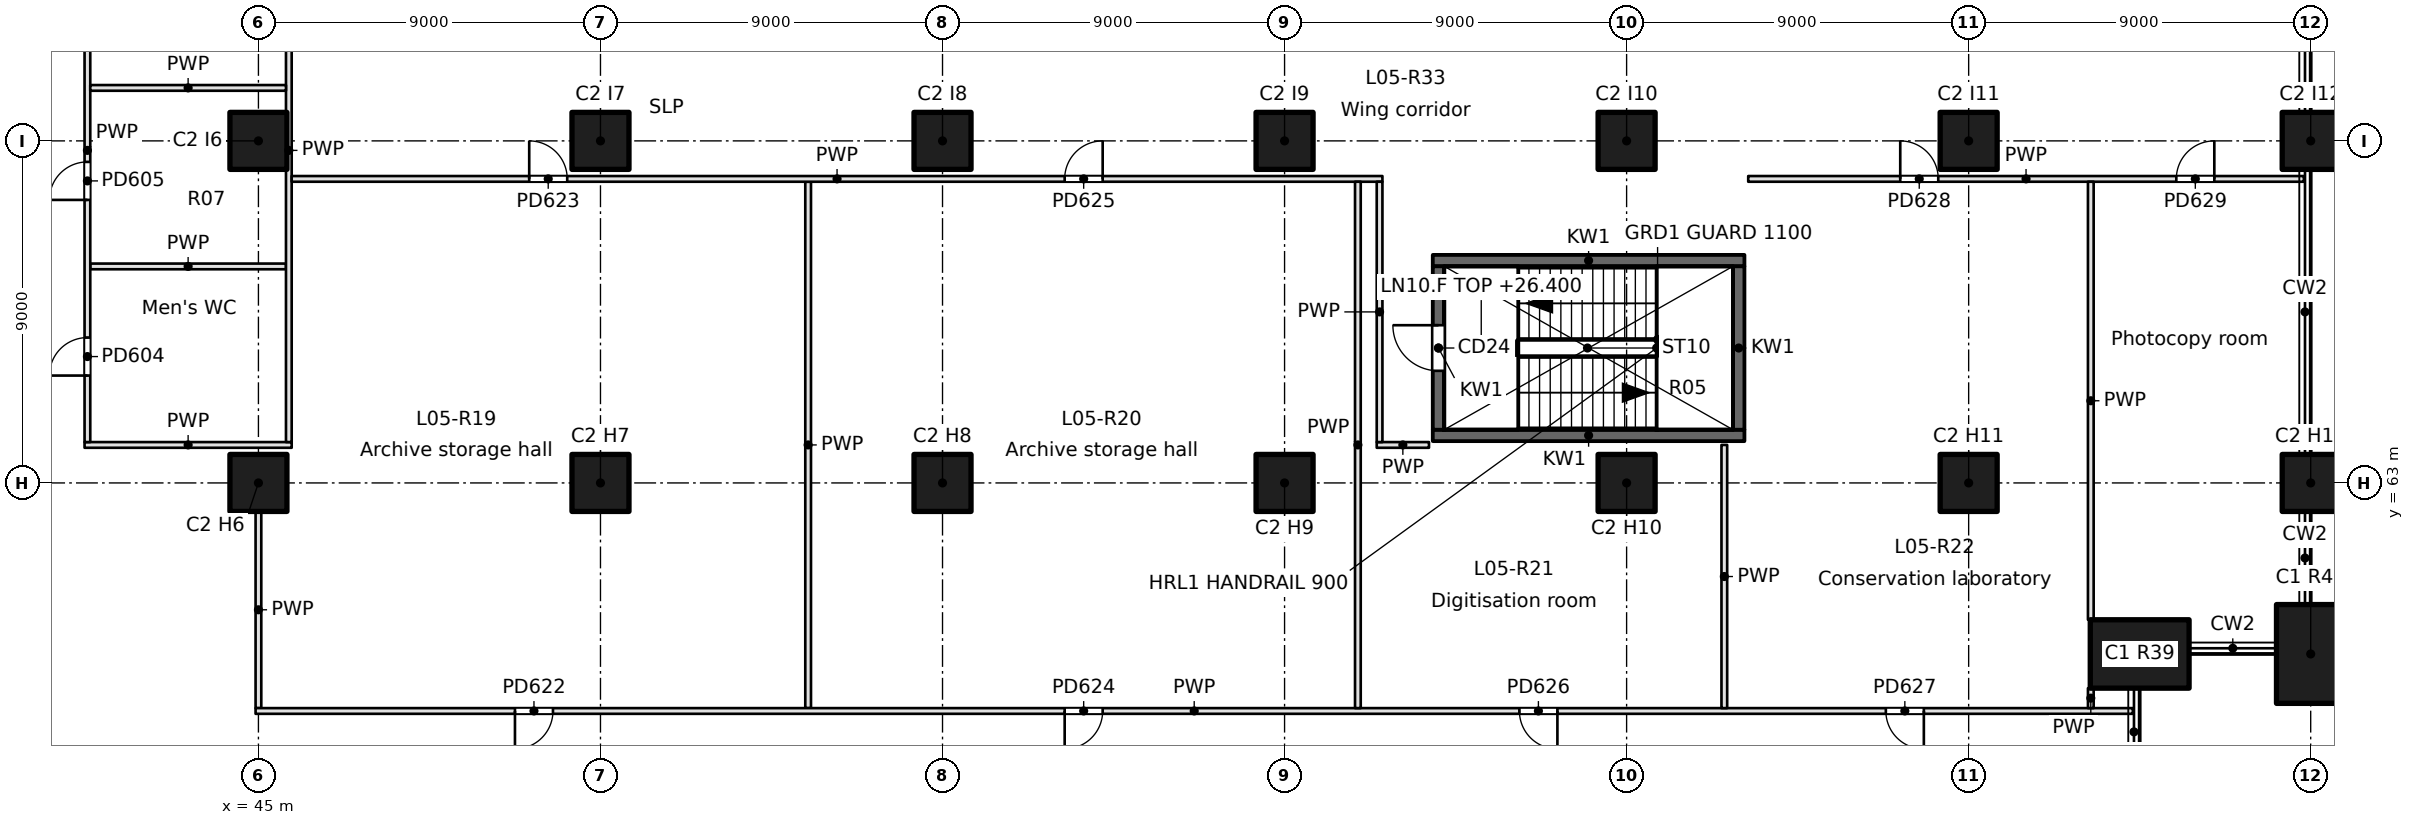
"""IFC4 building model, lengths in metres.
Left out: names, types, materials, properties, quantities, classifications, styles, units other than length and angle.
Written with IfcOpenShell. Run it as: python <this file> out.ifc"""

import sys

from ifc_helpers import new_model, si_unit, direction, frame, frame_2d, origin, origin_2d, place, context, subcontext, project, spatial, rectangle, extrude, element, fill, save


model = new_model("IFC4")
c1 = context("Model", 3, precision=1e-05, world=origin(), true_north=direction((0.0, 1.0)))
c2 = subcontext(c1, "Body", "Model", "MODEL_VIEW")
j1 = project(units=[si_unit("LENGTHUNIT", "METRE"), si_unit("PLANEANGLEUNIT", "RADIAN")], contexts=[c1])
p1 = place(None, origin())
s1 = spatial("IfcSite", under=j1, at=p1, CompositionType="ELEMENT")
p2 = place(p1, origin())
s2 = spatial("IfcBuilding", under=s1, at=p2, CompositionType="ELEMENT")
p3 = place(p2, frame((0.0, 0.0, 26.4)))
s3 = spatial("IfcBuildingStorey", under=s2, at=p3, CompositionType="ELEMENT", Elevation=26.4)
for number, where, z_axis, x_axis in (
    (1, (94.5, 58.5, 0.0), (0.0, 0.0, 1.0), (1.0, 0.0, 0.0)),
    (2, (99.0, 58.5, 0.0), (0.0, 0.0, 1.0), (0.0, 1.0, 0.0)),
):
    element("IfcColumn", number, at=place(p3, frame(where, z_axis=z_axis, x_axis=x_axis)), inside=s3, PredefinedType="COLUMN", context=c2, shape_type="SweptSolid", body=[
        extrude(rectangle(XDim=2.6, YDim=1.8, at=origin_2d()), origin(), (0.0, 0.0, 1.0), 4.8),
    ])
for number, where, z_axis, x_axis in (
    (3, (99.0, 63.0, 0.0), (0.0, 0.0, 1.0), (1.0, 0.0, 0.0)),
    (4, (99.0, 72.0, 0.0), (0.0, 0.0, 1.0), (1.0, 0.0, 0.0)),
    (5, (45.0, 63.0, 0.0), (0.0, 0.0, 1.0), (1.0, 0.0, 0.0)),
    (6, (45.0, 72.0, 0.0), (0.0, 0.0, 1.0), (1.0, 0.0, 0.0)),
    (7, (54.0, 63.0, 0.0), (0.0, 0.0, 1.0), (1.0, 0.0, 0.0)),
    (8, (54.0, 72.0, 0.0), (0.0, 0.0, 1.0), (1.0, 0.0, 0.0)),
    (9, (63.0, 63.0, 0.0), (0.0, 0.0, 1.0), (1.0, 0.0, 0.0)),
    (10, (63.0, 72.0, 0.0), (0.0, 0.0, 1.0), (1.0, 0.0, 0.0)),
    (11, (72.0, 63.0, 0.0), (0.0, 0.0, 1.0), (1.0, 0.0, 0.0)),
    (12, (72.0, 72.0, 0.0), (0.0, 0.0, 1.0), (1.0, 0.0, 0.0)),
    (13, (81.0, 63.0, 0.0), (0.0, 0.0, 1.0), (1.0, 0.0, 0.0)),
    (14, (81.0, 72.0, 0.0), (0.0, 0.0, 1.0), (1.0, 0.0, 0.0)),
    (15, (90.0, 63.0, 0.0), (0.0, 0.0, 1.0), (1.0, 0.0, 0.0)),
    (16, (90.0, 72.0, 0.0), (0.0, 0.0, 1.0), (1.0, 0.0, 0.0)),
):
    element("IfcColumn", number, at=place(p3, frame(where, z_axis=z_axis, x_axis=x_axis)), inside=s3, PredefinedType="COLUMN", context=c2, shape_type="SweptSolid", body=[
        extrude(rectangle(XDim=1.5, YDim=1.5, at=origin_2d()), origin(), (0.0, 0.0, 1.0), 4.8),
    ])
for number, where, z_axis, x_axis in (
    (17, (75.9, 64.25, -0.35), (0.0, 0.0, 1.0), (1.0, 0.0, 0.0)),
    (18, (75.9, 68.85, -0.35), (0.0, 0.0, 1.0), (1.0, 0.0, 0.0)),
):
    element("IfcWall", number, at=place(p3, frame(where, z_axis=z_axis, x_axis=x_axis)), inside=s3, PredefinedType="SOLIDWALL", context=c2, shape_type="SweptSolid", body=[
        extrude(rectangle(XDim=8.2, YDim=0.3, at=frame_2d((4.1, 0.0))), origin(), (0.0, 0.0, 1.0), 4.7),
    ])
p4 = place(p3, frame((76.05, 64.4, -0.35), z_axis=(0.0, 0.0, 1.0), x_axis=(0.0, 1.0, 0.0)))
e19 = element("IfcWall", 19, at=p4, inside=s3, PredefinedType="SOLIDWALL", context=c2, shape_type="SweptSolid", body=[
    extrude(rectangle(XDim=4.3, YDim=0.3, at=frame_2d((2.15, 0.0))), origin(), (0.0, 0.0, 1.0), 4.7),
])
p5 = place(p4, frame((1.55, 0.0, 0.35)))
e20 = element("IfcOpeningElement", 20, at=p5, cuts=e19, PredefinedType="OPENING", context=c2, shape_type="SweptSolid", body=[
    extrude(rectangle(XDim=1.2, YDim=2.1, at=frame_2d((0.6, 1.05))), frame((0.0, 0.15, 0.0), z_axis=(0.0, -1.0, 0.0), x_axis=(1.0, 0.0, 0.0)), (0.0, 0.0, 1.0), 0.3),
])
p6 = place(p3, frame((83.95, 64.4, -0.35), z_axis=(0.0, 0.0, 1.0), x_axis=(0.0, 1.0, 0.0)))
e21 = element("IfcWall", 21, at=p6, inside=s3, PredefinedType="SOLIDWALL", context=c2, shape_type="SweptSolid", body=[
    extrude(rectangle(XDim=4.3, YDim=0.3, at=frame_2d((2.15, 0.0))), origin(), (0.0, 0.0, 1.0), 4.7),
])
p7 = place(p3, frame((40.575, 68.697, 0.0), z_axis=(0.0, 0.0, 1.0), x_axis=(1.0, 0.0, 0.0)))
e22 = element("IfcWall", 22, at=p7, inside=s3, PredefinedType="PARTITIONING", context=c2, shape_type="SweptSolid", body=[
    extrude(rectangle(XDim=5.15, YDim=0.15, at=frame_2d((2.575, 0.0))), origin(), (0.0, 0.0, 1.0), 4.35),
])
p8 = place(p3, frame((45.875, 64.0, 0.0), z_axis=(0.0, 0.0, 1.0), x_axis=(-1.0, 0.0, 0.0)))
e23 = element("IfcWall", 23, at=p8, inside=s3, PredefinedType="PARTITIONING", context=c2, shape_type="SweptSolid", body=[
    extrude(rectangle(XDim=5.45, YDim=0.15, at=frame_2d((2.725, 0.0))), origin(), (0.0, 0.0, 1.0), 4.35),
])
p9 = place(p3, frame((74.425, 64.0, 0.0), z_axis=(0.0, 0.0, 1.0), x_axis=(1.0, 0.0, 0.0)))
e24 = element("IfcWall", 24, at=p9, inside=s3, PredefinedType="PARTITIONING", context=c2, shape_type="SweptSolid", body=[
    extrude(rectangle(XDim=1.375, YDim=0.15, at=frame_2d((0.688, 0.0))), origin(), (0.0, 0.0, 1.0), 4.35),
])
p10 = place(p3, frame((45.8, 79.425, 0.0), z_axis=(0.0, 0.0, 1.0), x_axis=(0.0, -1.0, 0.0)))
e25 = element("IfcWall", 25, at=p10, inside=s3, PredefinedType="PARTITIONING", context=c2, shape_type="SweptSolid", body=[
    extrude(rectangle(XDim=15.35, YDim=0.15, at=frame_2d((7.675, 0.0))), origin(), (0.0, 0.0, 1.0), 4.35),
])
p11 = place(p3, frame((40.5, 64.075, 0.0), z_axis=(0.0, 0.0, 1.0), x_axis=(0.0, 1.0, 0.0)))
e26 = element("IfcWall", 26, at=p11, inside=s3, PredefinedType="PARTITIONING", context=c2, shape_type="SweptSolid", body=[
    extrude(rectangle(XDim=15.35, YDim=0.15, at=frame_2d((7.675, 0.0))), origin(), (0.0, 0.0, 1.0), 4.35),
])
p12 = place(p11, frame((1.75, 0.0, 0.0)))
e27 = element("IfcOpeningElement", 27, at=p12, cuts=e26, PredefinedType="OPENING", context=c2, shape_type="SweptSolid", body=[
    extrude(rectangle(XDim=1.0, YDim=2.1, at=frame_2d((0.5, 1.05))), frame((0.0, 0.075, 0.0), z_axis=(0.0, -1.0, 0.0), x_axis=(1.0, 0.0, 0.0)), (0.0, 0.0, 1.0), 0.15),
])
p13 = place(p11, frame((6.372, 0.0, 0.0)))
e28 = element("IfcOpeningElement", 28, at=p13, cuts=e26, PredefinedType="OPENING", context=c2, shape_type="SweptSolid", body=[
    extrude(rectangle(XDim=1.0, YDim=2.1, at=frame_2d((0.5, 1.05))), frame((0.0, 0.075, 0.0), z_axis=(0.0, -1.0, 0.0), x_axis=(1.0, 0.0, 0.0)), (0.0, 0.0, 1.0), 0.15),
])
p14 = place(p11, frame((10.569, 0.0, 0.0)))
e29 = element("IfcOpeningElement", 29, at=p14, cuts=e26, PredefinedType="OPENING", context=c2, shape_type="SweptSolid", body=[
    extrude(rectangle(XDim=1.0, YDim=2.1, at=frame_2d((0.5, 1.05))), frame((0.0, 0.075, 0.0), z_axis=(0.0, -1.0, 0.0), x_axis=(1.0, 0.0, 0.0)), (0.0, 0.0, 1.0), 0.15),
])
p15 = place(p3, frame((40.575, 73.394, 0.0), z_axis=(0.0, 0.0, 1.0), x_axis=(1.0, 0.0, 0.0)))
e30 = element("IfcWall", 30, at=p15, inside=s3, PredefinedType="PARTITIONING", context=c2, shape_type="SweptSolid", body=[
    extrude(rectangle(XDim=5.15, YDim=0.15, at=frame_2d((2.575, 0.0))), origin(), (0.0, 0.0, 1.0), 4.35),
])
p16 = place(p3, frame((45.0, 57.075, 0.0), z_axis=(0.0, 0.0, 1.0), x_axis=(0.0, 1.0, 0.0)))
e31 = element("IfcWall", 31, at=p16, inside=s3, PredefinedType="PARTITIONING", context=c2, shape_type="SweptSolid", body=[
    extrude(rectangle(XDim=5.175, YDim=0.15, at=frame_2d((2.587, 0.0))), origin(), (0.0, 0.0, 1.0), 4.35),
])
p17 = place(p3, frame((59.464, 57.075, 0.0), z_axis=(0.0, 0.0, 1.0), x_axis=(0.0, 1.0, 0.0)))
e32 = element("IfcWall", 32, at=p17, inside=s3, PredefinedType="PARTITIONING", context=c2, shape_type="SweptSolid", body=[
    extrude(rectangle(XDim=13.85, YDim=0.15, at=frame_2d((6.925, 0.0))), origin(), (0.0, 0.0, 1.0), 4.35),
])
p18 = place(p3, frame((94.32, 57.0, 0.0), z_axis=(0.0, 0.0, 1.0), x_axis=(-1.0, 0.0, 0.0)))
e33 = element("IfcWall", 33, at=p18, inside=s3, PredefinedType="PARTITIONING", context=c2, shape_type="SweptSolid", body=[
    extrude(rectangle(XDim=49.395, YDim=0.15, at=frame_2d((24.698, 0.0))), origin(), (0.0, 0.0, 1.0), 4.35),
])
p19 = place(p18, frame((41.57, 0.0, 0.0)))
e34 = element("IfcOpeningElement", 34, at=p19, cuts=e33, PredefinedType="OPENING", context=c2, shape_type="SweptSolid", body=[
    extrude(rectangle(XDim=1.0, YDim=2.1, at=frame_2d((0.5, 1.05))), frame((0.0, 0.075, 0.0), z_axis=(0.0, -1.0, 0.0), x_axis=(1.0, 0.0, 0.0)), (0.0, 0.0, 1.0), 0.15),
])
p20 = place(p18, frame((27.106, 0.0, 0.0)))
e35 = element("IfcOpeningElement", 35, at=p20, cuts=e33, PredefinedType="OPENING", context=c2, shape_type="SweptSolid", body=[
    extrude(rectangle(XDim=1.0, YDim=2.1, at=frame_2d((0.5, 1.05))), frame((0.0, 0.075, 0.0), z_axis=(0.0, -1.0, 0.0), x_axis=(1.0, 0.0, 0.0)), (0.0, 0.0, 1.0), 0.15),
])
p21 = place(p18, frame((15.141, 0.0, 0.0)))
e36 = element("IfcOpeningElement", 36, at=p21, cuts=e33, PredefinedType="OPENING", context=c2, shape_type="SweptSolid", body=[
    extrude(rectangle(XDim=1.0, YDim=2.1, at=frame_2d((0.5, 1.05))), frame((0.0, 0.075, 0.0), z_axis=(0.0, -1.0, 0.0), x_axis=(1.0, 0.0, 0.0)), (0.0, 0.0, 1.0), 0.15),
])
p22 = place(p18, frame((5.499, 0.0, 0.0)))
e37 = element("IfcOpeningElement", 37, at=p22, cuts=e33, PredefinedType="OPENING", context=c2, shape_type="SweptSolid", body=[
    extrude(rectangle(XDim=1.0, YDim=2.1, at=frame_2d((0.5, 1.05))), frame((0.0, 0.075, 0.0), z_axis=(0.0, -1.0, 0.0), x_axis=(1.0, 0.0, 0.0)), (0.0, 0.0, 1.0), 0.15),
])
p23 = place(p3, frame((45.875, 71.0, 0.0), z_axis=(0.0, 0.0, 1.0), x_axis=(1.0, 0.0, 0.0)))
e38 = element("IfcWall", 38, at=p23, inside=s3, PredefinedType="PARTITIONING", context=c2, shape_type="SweptSolid", body=[
    extrude(rectangle(XDim=28.7, YDim=0.15, at=frame_2d((14.35, 0.0))), origin(), (0.0, 0.0, 1.0), 4.35),
])
p24 = place(p23, frame((6.25, 0.0, 0.0)))
e39 = element("IfcOpeningElement", 39, at=p24, cuts=e38, PredefinedType="OPENING", context=c2, shape_type="SweptSolid", body=[
    extrude(rectangle(XDim=1.0, YDim=2.1, at=frame_2d((0.5, 1.05))), frame((0.0, 0.075, 0.0), z_axis=(0.0, -1.0, 0.0), x_axis=(1.0, 0.0, 0.0)), (0.0, 0.0, 1.0), 0.15),
])
p25 = place(p23, frame((20.339, 0.0, 0.0)))
e40 = element("IfcOpeningElement", 40, at=p25, cuts=e38, PredefinedType="OPENING", context=c2, shape_type="SweptSolid", body=[
    extrude(rectangle(XDim=1.0, YDim=2.1, at=frame_2d((0.5, 1.05))), frame((0.0, 0.075, 0.0), z_axis=(0.0, -1.0, 0.0), x_axis=(1.0, 0.0, 0.0)), (0.0, 0.0, 1.0), 0.15),
])
p26 = place(p3, frame((84.2, 71.0, 0.0), z_axis=(0.0, 0.0, 1.0), x_axis=(1.0, 0.0, 0.0)))
e41 = element("IfcWall", 41, at=p26, inside=s3, PredefinedType="PARTITIONING", context=c2, shape_type="SweptSolid", body=[
    extrude(rectangle(XDim=14.62, YDim=0.15, at=frame_2d((7.31, 0.0))), origin(), (0.0, 0.0, 1.0), 4.35),
])
p27 = place(p26, frame((4.0, 0.0, 0.0)))
e42 = element("IfcOpeningElement", 42, at=p27, cuts=e41, PredefinedType="OPENING", context=c2, shape_type="SweptSolid", body=[
    extrude(rectangle(XDim=1.0, YDim=2.1, at=frame_2d((0.5, 1.05))), frame((0.0, 0.075, 0.0), z_axis=(0.0, -1.0, 0.0), x_axis=(1.0, 0.0, 0.0)), (0.0, 0.0, 1.0), 0.15),
])
p28 = place(p26, frame((11.264, 0.0, 0.0)))
e43 = element("IfcOpeningElement", 43, at=p28, cuts=e41, PredefinedType="OPENING", context=c2, shape_type="SweptSolid", body=[
    extrude(rectangle(XDim=1.0, YDim=2.1, at=frame_2d((0.5, 1.05))), frame((0.0, 0.075, 0.0), z_axis=(0.0, -1.0, 0.0), x_axis=(1.0, 0.0, 0.0)), (0.0, 0.0, 1.0), 0.15),
])
p29 = place(p3, frame((73.929, 57.075, 0.0), z_axis=(0.0, 0.0, 1.0), x_axis=(0.0, 1.0, 0.0)))
e44 = element("IfcWall", 44, at=p29, inside=s3, PredefinedType="PARTITIONING", context=c2, shape_type="SweptSolid", body=[
    extrude(rectangle(XDim=13.85, YDim=0.15, at=frame_2d((6.925, 0.0))), origin(), (0.0, 0.0, 1.0), 4.35),
])
p30 = place(p3, frame((83.571, 57.075, 0.0), z_axis=(0.0, 0.0, 1.0), x_axis=(0.0, 1.0, 0.0)))
e45 = element("IfcWall", 45, at=p30, inside=s3, PredefinedType="PARTITIONING", context=c2, shape_type="SweptSolid", body=[
    extrude(rectangle(XDim=6.925, YDim=0.15, at=frame_2d((3.462, 0.0))), origin(), (0.0, 0.0, 1.0), 4.35),
])
p31 = place(p3, frame((74.5, 70.925, 0.0), z_axis=(0.0, 0.0, 1.0), x_axis=(0.0, -1.0, 0.0)))
e46 = element("IfcWall", 46, at=p31, inside=s3, PredefinedType="PARTITIONING", context=c2, shape_type="SweptSolid", body=[
    extrude(rectangle(XDim=6.85, YDim=0.15, at=frame_2d((3.425, 0.0))), origin(), (0.0, 0.0, 1.0), 4.35),
])
p32 = place(p3, frame((93.214, 57.075, 0.0), z_axis=(0.0, 0.0, 1.0), x_axis=(0.0, 1.0, 0.0)))
e47 = element("IfcWall", 47, at=p32, inside=s3, PredefinedType="PARTITIONING", context=c2, shape_type="SweptSolid", body=[
    extrude(rectangle(XDim=0.525, YDim=0.15, at=frame_2d((0.263, 0.0))), origin(), (0.0, 0.0, 1.0), 4.35),
])
p33 = place(p3, frame((93.214, 59.4, 0.0), z_axis=(0.0, 0.0, 1.0), x_axis=(0.0, 1.0, 0.0)))
e48 = element("IfcWall", 48, at=p33, inside=s3, PredefinedType="PARTITIONING", context=c2, shape_type="SweptSolid", body=[
    extrude(rectangle(XDim=11.525, YDim=0.15, at=frame_2d((5.763, 0.0))), origin(), (0.0, 0.0, 1.0), 4.35),
])
p34 = place(p5, origin())
e49 = element("IfcDoor", 49, at=p34, inside=s3, OperationType="SINGLE_SWING_RIGHT", PredefinedType="DOOR", context=c2, shape_type="SweptSolid", body=[
    extrude(rectangle(XDim=1.2, YDim=2.1, at=frame_2d((0.6, 1.05))), frame((0.0, 0.025, 0.0), z_axis=(0.0, -1.0, 0.0), x_axis=(1.0, 0.0, 0.0)), (0.0, 0.0, 1.0), 0.05),
])
fill(e20, e49)
p35 = place(p12, origin())
e50 = element("IfcDoor", 50, at=p35, inside=s3, OperationType="SINGLE_SWING_LEFT", PredefinedType="DOOR", context=c2, shape_type="SweptSolid", body=[
    extrude(rectangle(XDim=1.0, YDim=2.1, at=frame_2d((0.5, 1.05))), frame((0.0, 0.025, 0.0), z_axis=(0.0, -1.0, 0.0), x_axis=(1.0, 0.0, 0.0)), (0.0, 0.0, 1.0), 0.05),
])
fill(e27, e50)
p36 = place(p13, origin())
e51 = element("IfcDoor", 51, at=p36, inside=s3, OperationType="SINGLE_SWING_LEFT", PredefinedType="DOOR", context=c2, shape_type="SweptSolid", body=[
    extrude(rectangle(XDim=1.0, YDim=2.1, at=frame_2d((0.5, 1.05))), frame((0.0, 0.025, 0.0), z_axis=(0.0, -1.0, 0.0), x_axis=(1.0, 0.0, 0.0)), (0.0, 0.0, 1.0), 0.05),
])
fill(e28, e51)
p37 = place(p19, origin())
e52 = element("IfcDoor", 52, at=p37, inside=s3, OperationType="SINGLE_SWING_RIGHT", PredefinedType="DOOR", context=c2, shape_type="SweptSolid", body=[
    extrude(rectangle(XDim=1.0, YDim=2.1, at=frame_2d((0.5, 1.05))), frame((0.0, 0.025, 0.0), z_axis=(0.0, -1.0, 0.0), x_axis=(1.0, 0.0, 0.0)), (0.0, 0.0, 1.0), 0.05),
])
fill(e34, e52)
p38 = place(p24, origin())
e53 = element("IfcDoor", 53, at=p38, inside=s3, OperationType="SINGLE_SWING_LEFT", PredefinedType="DOOR", context=c2, shape_type="SweptSolid", body=[
    extrude(rectangle(XDim=1.0, YDim=2.1, at=frame_2d((0.5, 1.05))), frame((0.0, 0.025, 0.0), z_axis=(0.0, -1.0, 0.0), x_axis=(1.0, 0.0, 0.0)), (0.0, 0.0, 1.0), 0.05),
])
fill(e39, e53)
p39 = place(p20, origin())
e54 = element("IfcDoor", 54, at=p39, inside=s3, OperationType="SINGLE_SWING_RIGHT", PredefinedType="DOOR", context=c2, shape_type="SweptSolid", body=[
    extrude(rectangle(XDim=1.0, YDim=2.1, at=frame_2d((0.5, 1.05))), frame((0.0, 0.025, 0.0), z_axis=(0.0, -1.0, 0.0), x_axis=(1.0, 0.0, 0.0)), (0.0, 0.0, 1.0), 0.05),
])
fill(e35, e54)
p40 = place(p25, origin())
e55 = element("IfcDoor", 55, at=p40, inside=s3, OperationType="SINGLE_SWING_RIGHT", PredefinedType="DOOR", context=c2, shape_type="SweptSolid", body=[
    extrude(rectangle(XDim=1.0, YDim=2.1, at=frame_2d((0.5, 1.05))), frame((0.0, 0.025, 0.0), z_axis=(0.0, -1.0, 0.0), x_axis=(1.0, 0.0, 0.0)), (0.0, 0.0, 1.0), 0.05),
])
fill(e40, e55)
p41 = place(p21, origin())
e56 = element("IfcDoor", 56, at=p41, inside=s3, OperationType="SINGLE_SWING_LEFT", PredefinedType="DOOR", context=c2, shape_type="SweptSolid", body=[
    extrude(rectangle(XDim=1.0, YDim=2.1, at=frame_2d((0.5, 1.05))), frame((0.0, 0.025, 0.0), z_axis=(0.0, -1.0, 0.0), x_axis=(1.0, 0.0, 0.0)), (0.0, 0.0, 1.0), 0.05),
])
fill(e36, e56)
p42 = place(p22, origin())
e57 = element("IfcDoor", 57, at=p42, inside=s3, OperationType="SINGLE_SWING_LEFT", PredefinedType="DOOR", context=c2, shape_type="SweptSolid", body=[
    extrude(rectangle(XDim=1.0, YDim=2.1, at=frame_2d((0.5, 1.05))), frame((0.0, 0.025, 0.0), z_axis=(0.0, -1.0, 0.0), x_axis=(1.0, 0.0, 0.0)), (0.0, 0.0, 1.0), 0.05),
])
fill(e37, e57)
p43 = place(p27, origin())
e58 = element("IfcDoor", 58, at=p43, inside=s3, OperationType="SINGLE_SWING_LEFT", PredefinedType="DOOR", context=c2, shape_type="SweptSolid", body=[
    extrude(rectangle(XDim=1.0, YDim=2.1, at=frame_2d((0.5, 1.05))), frame((0.0, 0.025, 0.0), z_axis=(0.0, -1.0, 0.0), x_axis=(1.0, 0.0, 0.0)), (0.0, 0.0, 1.0), 0.05),
])
fill(e42, e58)
p44 = place(p28, origin())
e59 = element("IfcDoor", 59, at=p44, inside=s3, OperationType="SINGLE_SWING_RIGHT", PredefinedType="DOOR", context=c2, shape_type="SweptSolid", body=[
    extrude(rectangle(XDim=1.0, YDim=2.1, at=frame_2d((0.5, 1.05))), frame((0.0, 0.025, 0.0), z_axis=(0.0, -1.0, 0.0), x_axis=(1.0, 0.0, 0.0)), (0.0, 0.0, 1.0), 0.05),
])
fill(e43, e59)
save(model, sys.argv[1])
